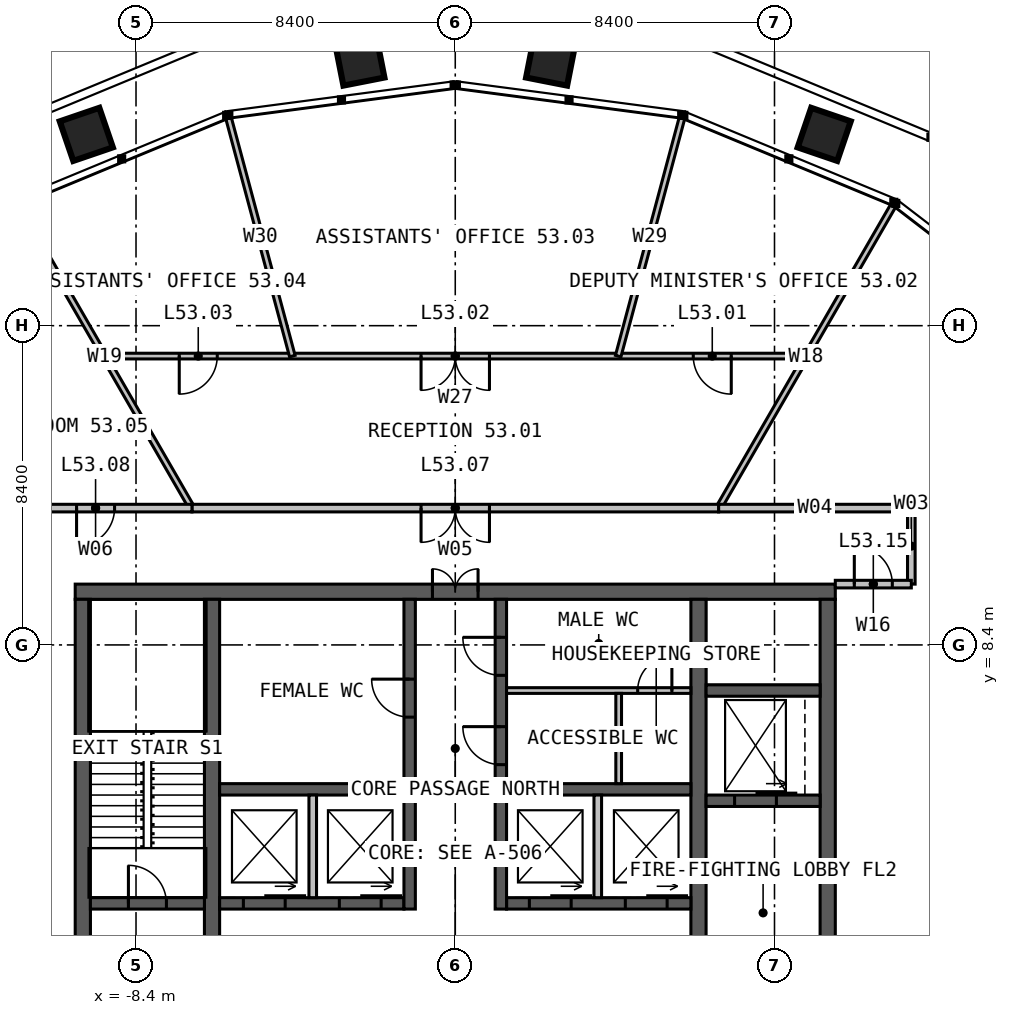
"""IFC4 building model, lengths in metres.
Left out: names, types, materials, properties, quantities, classifications, styles, units other than length and angle.
Written with IfcOpenShell. Run it as: python <this file> out.ifc"""

import sys

from ifc_helpers import new_model, si_unit, direction, frame, frame_2d, origin, place, context, subcontext, project, spatial, rectangle, extrude, element, fill, save


model = new_model("IFC4")
c1 = context("Model", 3, precision=1e-05, world=origin(), true_north=direction((0.0, 1.0)))
c2 = subcontext(c1, "Body", "Model", "MODEL_VIEW")
j1 = project(units=[si_unit("LENGTHUNIT", "METRE"), si_unit("PLANEANGLEUNIT", "RADIAN")], contexts=[c1])
p1 = place(None, origin())
s1 = spatial("IfcSite", under=j1, at=p1, CompositionType="ELEMENT")
p2 = place(p1, origin())
s2 = spatial("IfcBuilding", under=s1, at=p2, CompositionType="ELEMENT")
p3 = place(p2, frame((0.0, 0.0, 220.0)))
s3 = spatial("IfcBuildingStorey", under=s2, at=p3, CompositionType="ELEMENT", Elevation=220.0)
p4 = place(p3, frame((-10.0, 9.8, 0.0), z_axis=(0.0, 0.0, 1.0), x_axis=(1.0, 0.0, 0.0)))
e1 = element("IfcWall", 1, at=p4, inside=s3, PredefinedType="SOLIDWALL", context=c2, shape_type="SweptSolid", body=[
    extrude(rectangle(XDim=20.0, YDim=0.4, at=frame_2d((10.0, 0.0))), origin(), (0.0, 0.0, 1.0), 4.0),
])
p5 = place(p4, frame((9.4, 0.0, 0.0)))
e2 = element("IfcOpeningElement", 2, at=p5, cuts=e1, PredefinedType="OPENING", context=c2, shape_type="SweptSolid", body=[
    extrude(rectangle(XDim=1.2, YDim=2.2, at=frame_2d((0.6, 1.1))), frame((0.0, 0.21, 0.0), z_axis=(0.0, -1.0, 0.0), x_axis=(1.0, 0.0, 0.0)), (0.0, 0.0, 1.0), 0.42),
])
for number, where, z_axis, x_axis in (
    (3, (9.8, -9.6, 0.0), (0.0, 0.0, 1.0), (0.0, 1.0, 0.0)),
    (4, (-9.8, 9.6, 0.0), (0.0, 0.0, 1.0), (0.0, -1.0, 0.0)),
):
    element("IfcWall", number, at=place(p3, frame(where, z_axis=z_axis, x_axis=x_axis)), inside=s3, PredefinedType="SOLIDWALL", context=c2, shape_type="SweptSolid", body=[
        extrude(rectangle(XDim=19.2, YDim=0.4, at=frame_2d((9.6, 0.0))), origin(), (0.0, 0.0, 1.0), 4.0),
    ])
p6 = place(p3, frame((-6.4, -9.6, 0.0), z_axis=(0.0, 0.0, 1.0), x_axis=(0.0, 1.0, 0.0)))
e5 = element("IfcWall", 5, at=p6, inside=s3, PredefinedType="SOLIDWALL", context=c2, shape_type="SweptSolid", body=[
    extrude(rectangle(XDim=19.2, YDim=0.4, at=frame_2d((9.6, 0.0))), origin(), (0.0, 0.0, 1.0), 4.0),
])
p7 = place(p6, frame((9.1, 0.0, 0.0)))
e6 = element("IfcOpeningElement", 6, at=p7, cuts=e5, PredefinedType="OPENING", context=c2, shape_type="SweptSolid", body=[
    extrude(rectangle(XDim=1.0, YDim=2.2, at=frame_2d((0.5, 1.1))), frame((0.0, 0.21, 0.0), z_axis=(0.0, -1.0, 0.0), x_axis=(1.0, 0.0, 0.0)), (0.0, 0.0, 1.0), 0.42),
])
p8 = place(p3, frame((6.4, 9.6, 0.0), z_axis=(0.0, 0.0, 1.0), x_axis=(0.0, -1.0, 0.0)))
e7 = element("IfcWall", 7, at=p8, inside=s3, PredefinedType="SOLIDWALL", context=c2, shape_type="SweptSolid", body=[
    extrude(rectangle(XDim=19.2, YDim=0.4, at=frame_2d((9.6, 0.0))), origin(), (0.0, 0.0, 1.0), 4.0),
])
p9 = place(p8, frame((9.1, 0.0, 0.0)))
e8 = element("IfcOpeningElement", 8, at=p9, cuts=e7, PredefinedType="OPENING", context=c2, shape_type="SweptSolid", body=[
    extrude(rectangle(XDim=1.0, YDim=2.2, at=frame_2d((0.5, 1.1))), frame((0.0, 0.21, 0.0), z_axis=(0.0, -1.0, 0.0), x_axis=(1.0, 0.0, 0.0)), (0.0, 0.0, 1.0), 0.42),
])
p10 = place(p3, frame((-6.2, 1.6, 0.0), z_axis=(0.0, 0.0, 1.0), x_axis=(1.0, 0.0, 0.0)))
e9 = element("IfcWall", 9, at=p10, inside=s3, PredefinedType="SOLIDWALL", context=c2, shape_type="SweptSolid", body=[
    extrude(rectangle(XDim=4.85, YDim=0.3, at=frame_2d((2.425, 0.0))), origin(), (0.0, 0.0, 1.0), 4.0),
])
p11 = place(p10, frame((0.625, 0.0, 0.0)))
e10 = element("IfcOpeningElement", 10, at=p11, cuts=e9, PredefinedType="OPENING", context=c2, shape_type="SweptSolid", body=[
    extrude(rectangle(XDim=1.1, YDim=2.2, at=frame_2d((0.55, 1.1))), frame((0.0, 0.16, 0.0), z_axis=(0.0, -1.0, 0.0), x_axis=(1.0, 0.0, 0.0)), (0.0, 0.0, 1.0), 0.32),
])
p12 = place(p10, frame((3.15, 0.0, 0.0)))
e11 = element("IfcOpeningElement", 11, at=p12, cuts=e9, PredefinedType="OPENING", context=c2, shape_type="SweptSolid", body=[
    extrude(rectangle(XDim=1.1, YDim=2.2, at=frame_2d((0.55, 1.1))), frame((0.0, 0.16, 0.0), z_axis=(0.0, -1.0, 0.0), x_axis=(1.0, 0.0, 0.0)), (0.0, 0.0, 1.0), 0.32),
])
p13 = place(p3, frame((1.35, 1.6, 0.0), z_axis=(0.0, 0.0, 1.0), x_axis=(1.0, 0.0, 0.0)))
e12 = element("IfcWall", 12, at=p13, inside=s3, PredefinedType="SOLIDWALL", context=c2, shape_type="SweptSolid", body=[
    extrude(rectangle(XDim=4.85, YDim=0.3, at=frame_2d((2.425, 0.0))), origin(), (0.0, 0.0, 1.0), 4.0),
])
p14 = place(p13, frame((0.6, 0.0, 0.0)))
e13 = element("IfcOpeningElement", 13, at=p14, cuts=e12, PredefinedType="OPENING", context=c2, shape_type="SweptSolid", body=[
    extrude(rectangle(XDim=1.1, YDim=2.2, at=frame_2d((0.55, 1.1))), frame((0.0, 0.16, 0.0), z_axis=(0.0, -1.0, 0.0), x_axis=(1.0, 0.0, 0.0)), (0.0, 0.0, 1.0), 0.32),
])
p15 = place(p13, frame((3.125, 0.0, 0.0)))
e14 = element("IfcOpeningElement", 14, at=p15, cuts=e12, PredefinedType="OPENING", context=c2, shape_type="SweptSolid", body=[
    extrude(rectangle(XDim=1.1, YDim=2.2, at=frame_2d((0.55, 1.1))), frame((0.0, 0.16, 0.0), z_axis=(0.0, -1.0, 0.0), x_axis=(1.0, 0.0, 0.0)), (0.0, 0.0, 1.0), 0.32),
])
for number, where, z_axis, x_axis in (
    (15, (-6.2, 4.6, 0.0), (0.0, 0.0, 1.0), (1.0, 0.0, 0.0)),
    (16, (1.35, 4.6, 0.0), (0.0, 0.0, 1.0), (1.0, 0.0, 0.0)),
):
    element("IfcWall", number, at=place(p3, frame(where, z_axis=z_axis, x_axis=x_axis)), inside=s3, PredefinedType="SOLIDWALL", context=c2, shape_type="SweptSolid", body=[
        extrude(rectangle(XDim=4.85, YDim=0.3, at=frame_2d((2.425, 0.0))), origin(), (0.0, 0.0, 1.0), 4.0),
    ])
p16 = place(p3, frame((-1.2, 1.45, 0.0), z_axis=(0.0, 0.0, 1.0), x_axis=(0.0, 1.0, 0.0)))
e17 = element("IfcWall", 17, at=p16, inside=s3, PredefinedType="SOLIDWALL", context=c2, shape_type="SweptSolid", body=[
    extrude(rectangle(XDim=8.15, YDim=0.3, at=frame_2d((4.075, 0.0))), origin(), (0.0, 0.0, 1.0), 4.0),
])
p17 = place(p16, frame((5.05, 0.0, 0.0)))
e18 = element("IfcOpeningElement", 18, at=p17, cuts=e17, PredefinedType="OPENING", context=c2, shape_type="SweptSolid", body=[
    extrude(rectangle(XDim=1.0, YDim=2.2, at=frame_2d((0.5, 1.1))), frame((0.0, 0.16, 0.0), z_axis=(0.0, -1.0, 0.0), x_axis=(1.0, 0.0, 0.0)), (0.0, 0.0, 1.0), 0.32),
])
p18 = place(p3, frame((1.2, 1.45, 0.0), z_axis=(0.0, 0.0, 1.0), x_axis=(0.0, 1.0, 0.0)))
e19 = element("IfcWall", 19, at=p18, inside=s3, PredefinedType="SOLIDWALL", context=c2, shape_type="SweptSolid", body=[
    extrude(rectangle(XDim=8.15, YDim=0.3, at=frame_2d((4.075, 0.0))), origin(), (0.0, 0.0, 1.0), 4.0),
])
p19 = place(p18, frame((3.8, 0.0, 0.0)))
e20 = element("IfcOpeningElement", 20, at=p19, cuts=e19, PredefinedType="OPENING", context=c2, shape_type="SweptSolid", body=[
    extrude(rectangle(XDim=1.0, YDim=2.2, at=frame_2d((0.5, 1.1))), frame((0.0, 0.16, 0.0), z_axis=(0.0, -1.0, 0.0), x_axis=(1.0, 0.0, 0.0)), (0.0, 0.0, 1.0), 0.32),
])
p20 = place(p18, frame((6.15, 0.0, 0.0)))
e21 = element("IfcOpeningElement", 21, at=p20, cuts=e19, PredefinedType="OPENING", context=c2, shape_type="SweptSolid", body=[
    extrude(rectangle(XDim=1.0, YDim=2.2, at=frame_2d((0.5, 1.1))), frame((0.0, 0.16, 0.0), z_axis=(0.0, -1.0, 0.0), x_axis=(1.0, 0.0, 0.0)), (0.0, 0.0, 1.0), 0.32),
])
p21 = place(p3, frame((-9.6, 1.6, 0.0), z_axis=(0.0, 0.0, 1.0), x_axis=(1.0, 0.0, 0.0)))
e22 = element("IfcWall", 22, at=p21, inside=s3, PredefinedType="SOLIDWALL", context=c2, shape_type="SweptSolid", body=[
    extrude(rectangle(XDim=3.0, YDim=0.3, at=frame_2d((1.5, 0.0))), origin(), (0.0, 0.0, 1.0), 4.0),
])
p22 = place(p21, frame((1.0, 0.0, 0.0)))
e23 = element("IfcOpeningElement", 23, at=p22, cuts=e22, PredefinedType="OPENING", context=c2, shape_type="SweptSolid", body=[
    extrude(rectangle(XDim=1.0, YDim=2.2, at=frame_2d((0.5, 1.1))), frame((0.0, 0.16, 0.0), z_axis=(0.0, -1.0, 0.0), x_axis=(1.0, 0.0, 0.0)), (0.0, 0.0, 1.0), 0.32),
])
p23 = place(p3, frame((6.6, 4.3, 0.0), z_axis=(0.0, 0.0, 1.0), x_axis=(1.0, 0.0, 0.0)))
e24 = element("IfcWall", 24, at=p23, inside=s3, PredefinedType="SOLIDWALL", context=c2, shape_type="SweptSolid", body=[
    extrude(rectangle(XDim=3.0, YDim=0.3, at=frame_2d((1.5, 0.0))), origin(), (0.0, 0.0, 1.0), 4.0),
])
p24 = place(p23, frame((0.75, 0.0, 0.0)))
e25 = element("IfcOpeningElement", 25, at=p24, cuts=e24, PredefinedType="OPENING", context=c2, shape_type="SweptSolid", body=[
    extrude(rectangle(XDim=1.1, YDim=2.2, at=frame_2d((0.55, 1.1))), frame((0.0, 0.16, 0.0), z_axis=(0.0, -1.0, 0.0), x_axis=(1.0, 0.0, 0.0)), (0.0, 0.0, 1.0), 0.32),
])
p25 = place(p3, frame((6.6, 7.2, 0.0), z_axis=(0.0, 0.0, 1.0), x_axis=(1.0, 0.0, 0.0)))
e26 = element("IfcWall", 26, at=p25, inside=s3, PredefinedType="SOLIDWALL", context=c2, shape_type="SweptSolid", body=[
    extrude(rectangle(XDim=3.0, YDim=0.3, at=frame_2d((1.5, 0.0))), origin(), (0.0, 0.0, 1.0), 4.0),
])
for number, where, z_axis, x_axis in (
    (27, (-3.75, 1.75, 0.0), (0.0, 0.0, 1.0), (0.0, 1.0, 0.0)),
    (28, (3.75, 1.75, 0.0), (0.0, 0.0, 1.0), (0.0, 1.0, 0.0)),
):
    element("IfcWall", number, at=place(p3, frame(where, z_axis=z_axis, x_axis=x_axis)), inside=s3, PredefinedType="SOLIDWALL", context=c2, shape_type="SweptSolid", body=[
        extrude(rectangle(XDim=2.7, YDim=0.2, at=frame_2d((1.35, 0.0))), origin(), (0.0, 0.0, 1.0), 3.75),
    ])
p26 = place(p3, frame((1.35, 7.2, 0.0), z_axis=(0.0, 0.0, 1.0), x_axis=(1.0, 0.0, 0.0)))
e29 = element("IfcWall", 29, at=p26, inside=s3, PredefinedType="PARTITIONING", context=c2, shape_type="SweptSolid", body=[
    extrude(rectangle(XDim=4.85, YDim=0.15, at=frame_2d((2.425, 0.0))), origin(), (0.0, 0.0, 1.0), 3.75),
])
p27 = place(p26, frame((3.45, 0.0, 0.0)))
e30 = element("IfcOpeningElement", 30, at=p27, cuts=e29, PredefinedType="OPENING", context=c2, shape_type="SweptSolid", body=[
    extrude(rectangle(XDim=0.9, YDim=2.2, at=frame_2d((0.45, 1.1))), frame((0.0, 0.085, 0.0), z_axis=(0.0, -1.0, 0.0), x_axis=(1.0, 0.0, 0.0)), (0.0, 0.0, 1.0), 0.17),
])
p28 = place(p3, frame((4.3, 4.75, 0.0), z_axis=(0.0, 0.0, 1.0), x_axis=(0.0, 1.0, 0.0)))
e31 = element("IfcWall", 31, at=p28, inside=s3, PredefinedType="PARTITIONING", context=c2, shape_type="SweptSolid", body=[
    extrude(rectangle(XDim=2.375, YDim=0.15, at=frame_2d((1.188, 0.0))), origin(), (0.0, 0.0, 1.0), 3.75),
])
for number, where, z_axis, x_axis in (
    (32, (6.928, 12.0, 0.0), (0.0, 0.0, 1.0), (0.5, 0.866, 0.0)),
    (33, (-6.928, 12.0, 0.0), (0.0, 0.0, 1.0), (-0.5, 0.866, 0.0)),
):
    element("IfcWall", number, at=place(p3, frame(where, z_axis=z_axis, x_axis=x_axis)), inside=s3, PredefinedType="PARTITIONING", context=c2, shape_type="SweptSolid", body=[
        extrude(rectangle(XDim=9.187, YDim=0.15, at=frame_2d((4.594, 0.0))), origin(), (0.0, 0.0, 1.0), 2.89),
    ])
p29 = place(p3, frame((12.0, 10.0, 0.0), z_axis=(0.0, 0.0, 1.0), x_axis=(0.0, 1.0, 0.0)))
e34 = element("IfcWall", 34, at=p29, inside=s3, PredefinedType="PARTITIONING", context=c2, shape_type="SweptSolid", body=[
    extrude(rectangle(XDim=2.0, YDim=0.2, at=frame_2d((1.0, 0.0))), origin(), (0.0, 0.0, 1.0), 3.8),
])
p30 = place(p3, frame((12.0, 12.0, 0.0), z_axis=(0.0, 0.0, 1.0), x_axis=(-1.0, 0.0, 0.0)))
e35 = element("IfcWall", 35, at=p30, inside=s3, PredefinedType="PARTITIONING", context=c2, shape_type="SweptSolid", body=[
    extrude(rectangle(XDim=5.072, YDim=0.2, at=frame_2d((2.536, 0.0))), origin(), (0.0, 0.0, 1.0), 3.8),
])
p31 = place(p3, frame((9.238, 16.0, 0.0), z_axis=(0.0, 0.0, 1.0), x_axis=(-1.0, 0.0, 0.0)))
e36 = element("IfcWall", 36, at=p31, inside=s3, PredefinedType="PARTITIONING", context=c2, shape_type="SweptSolid", body=[
    extrude(rectangle(XDim=18.475, YDim=0.15, at=frame_2d((9.238, 0.0))), origin(), (0.0, 0.0, 1.0), 2.89),
])
p32 = place(p31, frame((1.975, 0.0, 0.0)))
e37 = element("IfcOpeningElement", 37, at=p32, cuts=e36, PredefinedType="OPENING", context=c2, shape_type="SweptSolid", body=[
    extrude(rectangle(XDim=1.0, YDim=2.2, at=frame_2d((0.5, 1.1))), frame((0.0, 0.085, 0.0), z_axis=(0.0, -1.0, 0.0), x_axis=(1.0, 0.0, 0.0)), (0.0, 0.0, 1.0), 0.17),
])
p33 = place(p31, frame((8.338, 0.0, 0.0)))
e38 = element("IfcOpeningElement", 38, at=p33, cuts=e36, PredefinedType="OPENING", context=c2, shape_type="SweptSolid", body=[
    extrude(rectangle(XDim=1.8, YDim=2.2, at=frame_2d((0.9, 1.1))), frame((0.0, 0.085, 0.0), z_axis=(0.0, -1.0, 0.0), x_axis=(1.0, 0.0, 0.0)), (0.0, 0.0, 1.0), 0.17),
])
p34 = place(p31, frame((15.5, 0.0, 0.0)))
e39 = element("IfcOpeningElement", 39, at=p34, cuts=e36, PredefinedType="OPENING", context=c2, shape_type="SweptSolid", body=[
    extrude(rectangle(XDim=1.0, YDim=2.2, at=frame_2d((0.5, 1.1))), frame((0.0, 0.085, 0.0), z_axis=(0.0, -1.0, 0.0), x_axis=(1.0, 0.0, 0.0)), (0.0, 0.0, 1.0), 0.17),
])
for number, where, z_axis, x_axis in (
    (40, (4.287, 16.0, 0.0), (0.0, 0.0, 1.0), (0.259, 0.966, 0.0)),
    (41, (-4.287, 16.0, 0.0), (0.0, 0.0, 1.0), (-0.259, 0.966, 0.0)),
):
    element("IfcWall", number, at=place(p3, frame(where, z_axis=z_axis, x_axis=x_axis)), inside=s3, PredefinedType="PARTITIONING", context=c2, shape_type="SweptSolid", body=[
        extrude(rectangle(XDim=6.479, YDim=0.15, at=frame_2d((3.239, 0.0))), origin(), (0.0, 0.0, 1.0), 2.89),
    ])
p35 = place(p3, frame((6.928, 12.0, 0.0), z_axis=(0.0, 0.0, 1.0), x_axis=(-1.0, 0.0, 0.0)))
e42 = element("IfcWall", 42, at=p35, inside=s3, PredefinedType="PARTITIONING", context=c2, shape_type="SweptSolid", body=[
    extrude(rectangle(XDim=13.856, YDim=0.2, at=frame_2d((6.928, 0.0))), origin(), (0.0, 0.0, 1.0), 3.8),
])
p36 = place(p35, frame((6.028, 0.0, 0.0)))
e43 = element("IfcOpeningElement", 43, at=p36, cuts=e42, PredefinedType="OPENING", context=c2, shape_type="SweptSolid", body=[
    extrude(rectangle(XDim=1.8, YDim=2.2, at=frame_2d((0.9, 1.1))), frame((0.0, 0.11, 0.0), z_axis=(0.0, -1.0, 0.0), x_axis=(1.0, 0.0, 0.0)), (0.0, 0.0, 1.0), 0.22),
])
p37 = place(p3, frame((-6.928, 12.0, 0.0), z_axis=(0.0, 0.0, 1.0), x_axis=(-1.0, 0.0, 0.0)))
e44 = element("IfcWall", 44, at=p37, inside=s3, PredefinedType="PARTITIONING", context=c2, shape_type="SweptSolid", body=[
    extrude(rectangle(XDim=5.072, YDim=0.2, at=frame_2d((2.536, 0.0))), origin(), (0.0, 0.0, 1.0), 3.8),
])
p38 = place(p37, frame((2.036, 0.0, 0.0)))
e45 = element("IfcOpeningElement", 45, at=p38, cuts=e44, PredefinedType="OPENING", context=c2, shape_type="SweptSolid", body=[
    extrude(rectangle(XDim=1.0, YDim=2.2, at=frame_2d((0.5, 1.1))), frame((0.0, 0.11, 0.0), z_axis=(0.0, -1.0, 0.0), x_axis=(1.0, 0.0, 0.0)), (0.0, 0.0, 1.0), 0.22),
])
p39 = place(p3, frame((10.0, 10.0, 0.0), z_axis=(0.0, 0.0, 1.0), x_axis=(1.0, 0.0, 0.0)))
e46 = element("IfcWall", 46, at=p39, inside=s3, PredefinedType="PARTITIONING", context=c2, shape_type="SweptSolid", body=[
    extrude(rectangle(XDim=2.0, YDim=0.2, at=frame_2d((1.0, 0.0))), origin(), (0.0, 0.0, 1.0), 3.8),
])
p40 = place(p39, frame((0.5, 0.0, 0.0)))
e47 = element("IfcOpeningElement", 47, at=p40, cuts=e46, PredefinedType="OPENING", context=c2, shape_type="SweptSolid", body=[
    extrude(rectangle(XDim=1.0, YDim=2.2, at=frame_2d((0.5, 1.1))), frame((0.0, 0.11, 0.0), z_axis=(0.0, -1.0, 0.0), x_axis=(1.0, 0.0, 0.0)), (0.0, 0.0, 1.0), 0.22),
])
p41 = place(p5, origin())
e48 = element("IfcDoor", 48, at=p41, inside=s3, OperationType="DOUBLE_DOOR_SINGLE_SWING", PredefinedType="DOOR", context=c2, shape_type="SweptSolid", body=[
    extrude(rectangle(XDim=1.2, YDim=2.2, at=frame_2d((0.6, 1.1))), frame((0.0, 0.025, 0.0), z_axis=(0.0, -1.0, 0.0), x_axis=(1.0, 0.0, 0.0)), (0.0, 0.0, 1.0), 0.05),
])
fill(e2, e48)
p42 = place(p22, origin())
e49 = element("IfcDoor", 49, at=p42, inside=s3, OperationType="SINGLE_SWING_LEFT", PredefinedType="DOOR", context=c2, shape_type="SweptSolid", body=[
    extrude(rectangle(XDim=1.0, YDim=2.2, at=frame_2d((0.5, 1.1))), frame((0.0, 0.025, 0.0), z_axis=(0.0, -1.0, 0.0), x_axis=(1.0, 0.0, 0.0)), (0.0, 0.0, 1.0), 0.05),
])
fill(e23, e49)
p43 = place(p17, origin())
e50 = element("IfcDoor", 50, at=p43, inside=s3, OperationType="SINGLE_SWING_RIGHT", PredefinedType="DOOR", context=c2, shape_type="SweptSolid", body=[
    extrude(rectangle(XDim=1.0, YDim=2.2, at=frame_2d((0.5, 1.1))), frame((0.0, 0.025, 0.0), z_axis=(0.0, -1.0, 0.0), x_axis=(1.0, 0.0, 0.0)), (0.0, 0.0, 1.0), 0.05),
])
fill(e18, e50)
p44 = place(p19, origin())
e51 = element("IfcDoor", 51, at=p44, inside=s3, OperationType="SINGLE_SWING_RIGHT", PredefinedType="DOOR", context=c2, shape_type="SweptSolid", body=[
    extrude(rectangle(XDim=1.0, YDim=2.2, at=frame_2d((0.5, 1.1))), frame((0.0, 0.025, 0.0), z_axis=(0.0, -1.0, 0.0), x_axis=(1.0, 0.0, 0.0)), (0.0, 0.0, 1.0), 0.05),
])
fill(e20, e51)
p45 = place(p20, origin())
e52 = element("IfcDoor", 52, at=p45, inside=s3, OperationType="SINGLE_SWING_RIGHT", PredefinedType="DOOR", context=c2, shape_type="SweptSolid", body=[
    extrude(rectangle(XDim=1.0, YDim=2.2, at=frame_2d((0.5, 1.1))), frame((0.0, 0.025, 0.0), z_axis=(0.0, -1.0, 0.0), x_axis=(1.0, 0.0, 0.0)), (0.0, 0.0, 1.0), 0.05),
])
fill(e21, e52)
p46 = place(p27, origin())
e53 = element("IfcDoor", 53, at=p46, inside=s3, OperationType="SINGLE_SWING_RIGHT", PredefinedType="DOOR", context=c2, shape_type="SweptSolid", body=[
    extrude(rectangle(XDim=0.9, YDim=2.2, at=frame_2d((0.45, 1.1))), frame((0.0, 0.025, 0.0), z_axis=(0.0, -1.0, 0.0), x_axis=(1.0, 0.0, 0.0)), (0.0, 0.0, 1.0), 0.05),
])
fill(e30, e53)
p47 = place(p11, origin())
e54 = element("IfcDoor", 54, at=p47, inside=s3, OperationType="SLIDING_TO_LEFT", PredefinedType="DOOR", context=c2, shape_type="SweptSolid", body=[
    extrude(rectangle(XDim=1.1, YDim=2.2, at=frame_2d((0.55, 1.1))), frame((0.0, 0.025, 0.0), z_axis=(0.0, -1.0, 0.0), x_axis=(1.0, 0.0, 0.0)), (0.0, 0.0, 1.0), 0.05),
])
fill(e10, e54)
p48 = place(p12, origin())
e55 = element("IfcDoor", 55, at=p48, inside=s3, OperationType="SLIDING_TO_LEFT", PredefinedType="DOOR", context=c2, shape_type="SweptSolid", body=[
    extrude(rectangle(XDim=1.1, YDim=2.2, at=frame_2d((0.55, 1.1))), frame((0.0, 0.025, 0.0), z_axis=(0.0, -1.0, 0.0), x_axis=(1.0, 0.0, 0.0)), (0.0, 0.0, 1.0), 0.05),
])
fill(e11, e55)
p49 = place(p14, origin())
e56 = element("IfcDoor", 56, at=p49, inside=s3, OperationType="SLIDING_TO_LEFT", PredefinedType="DOOR", context=c2, shape_type="SweptSolid", body=[
    extrude(rectangle(XDim=1.1, YDim=2.2, at=frame_2d((0.55, 1.1))), frame((0.0, 0.025, 0.0), z_axis=(0.0, -1.0, 0.0), x_axis=(1.0, 0.0, 0.0)), (0.0, 0.0, 1.0), 0.05),
])
fill(e13, e56)
p50 = place(p15, origin())
e57 = element("IfcDoor", 57, at=p50, inside=s3, OperationType="SLIDING_TO_LEFT", PredefinedType="DOOR", context=c2, shape_type="SweptSolid", body=[
    extrude(rectangle(XDim=1.1, YDim=2.2, at=frame_2d((0.55, 1.1))), frame((0.0, 0.025, 0.0), z_axis=(0.0, -1.0, 0.0), x_axis=(1.0, 0.0, 0.0)), (0.0, 0.0, 1.0), 0.05),
])
fill(e14, e57)
p51 = place(p24, origin())
e58 = element("IfcDoor", 58, at=p51, inside=s3, OperationType="SLIDING_TO_LEFT", PredefinedType="DOOR", context=c2, shape_type="SweptSolid", body=[
    extrude(rectangle(XDim=1.1, YDim=2.2, at=frame_2d((0.55, 1.1))), frame((0.0, 0.025, 0.0), z_axis=(0.0, -1.0, 0.0), x_axis=(1.0, 0.0, 0.0)), (0.0, 0.0, 1.0), 0.05),
])
fill(e25, e58)
p52 = place(p32, origin())
e59 = element("IfcDoor", 59, at=p52, inside=s3, OperationType="SINGLE_SWING_LEFT", PredefinedType="DOOR", context=c2, shape_type="SweptSolid", body=[
    extrude(rectangle(XDim=1.0, YDim=2.2, at=frame_2d((0.5, 1.1))), frame((0.0, 0.025, 0.0), z_axis=(0.0, -1.0, 0.0), x_axis=(1.0, 0.0, 0.0)), (0.0, 0.0, 1.0), 0.05),
])
fill(e37, e59)
p53 = place(p33, origin())
e60 = element("IfcDoor", 60, at=p53, inside=s3, OperationType="DOUBLE_DOOR_SINGLE_SWING", PredefinedType="DOOR", context=c2, shape_type="SweptSolid", body=[
    extrude(rectangle(XDim=1.8, YDim=2.2, at=frame_2d((0.9, 1.1))), frame((0.0, 0.025, 0.0), z_axis=(0.0, -1.0, 0.0), x_axis=(1.0, 0.0, 0.0)), (0.0, 0.0, 1.0), 0.05),
])
fill(e38, e60)
p54 = place(p34, origin())
e61 = element("IfcDoor", 61, at=p54, inside=s3, OperationType="SINGLE_SWING_RIGHT", PredefinedType="DOOR", context=c2, shape_type="SweptSolid", body=[
    extrude(rectangle(XDim=1.0, YDim=2.2, at=frame_2d((0.5, 1.1))), frame((0.0, 0.025, 0.0), z_axis=(0.0, -1.0, 0.0), x_axis=(1.0, 0.0, 0.0)), (0.0, 0.0, 1.0), 0.05),
])
fill(e39, e61)
p55 = place(p36, origin())
e62 = element("IfcDoor", 62, at=p55, inside=s3, OperationType="DOUBLE_DOOR_SINGLE_SWING", PredefinedType="DOOR", context=c2, shape_type="SweptSolid", body=[
    extrude(rectangle(XDim=1.8, YDim=2.2, at=frame_2d((0.9, 1.1))), frame((0.0, 0.025, 0.0), z_axis=(0.0, -1.0, 0.0), x_axis=(1.0, 0.0, 0.0)), (0.0, 0.0, 1.0), 0.05),
])
fill(e43, e62)
p56 = place(p38, origin())
e63 = element("IfcDoor", 63, at=p56, inside=s3, OperationType="SINGLE_SWING_RIGHT", PredefinedType="DOOR", context=c2, shape_type="SweptSolid", body=[
    extrude(rectangle(XDim=1.0, YDim=2.2, at=frame_2d((0.5, 1.1))), frame((0.0, 0.025, 0.0), z_axis=(0.0, -1.0, 0.0), x_axis=(1.0, 0.0, 0.0)), (0.0, 0.0, 1.0), 0.05),
])
fill(e45, e63)
p57 = place(p40, origin())
e64 = element("IfcDoor", 64, at=p57, inside=s3, OperationType="SINGLE_SWING_LEFT", PredefinedType="DOOR", context=c2, shape_type="SweptSolid", body=[
    extrude(rectangle(XDim=1.0, YDim=2.2, at=frame_2d((0.5, 1.1))), frame((0.0, 0.025, 0.0), z_axis=(0.0, -1.0, 0.0), x_axis=(1.0, 0.0, 0.0)), (0.0, 0.0, 1.0), 0.05),
])
fill(e47, e64)
save(model, sys.argv[1])
